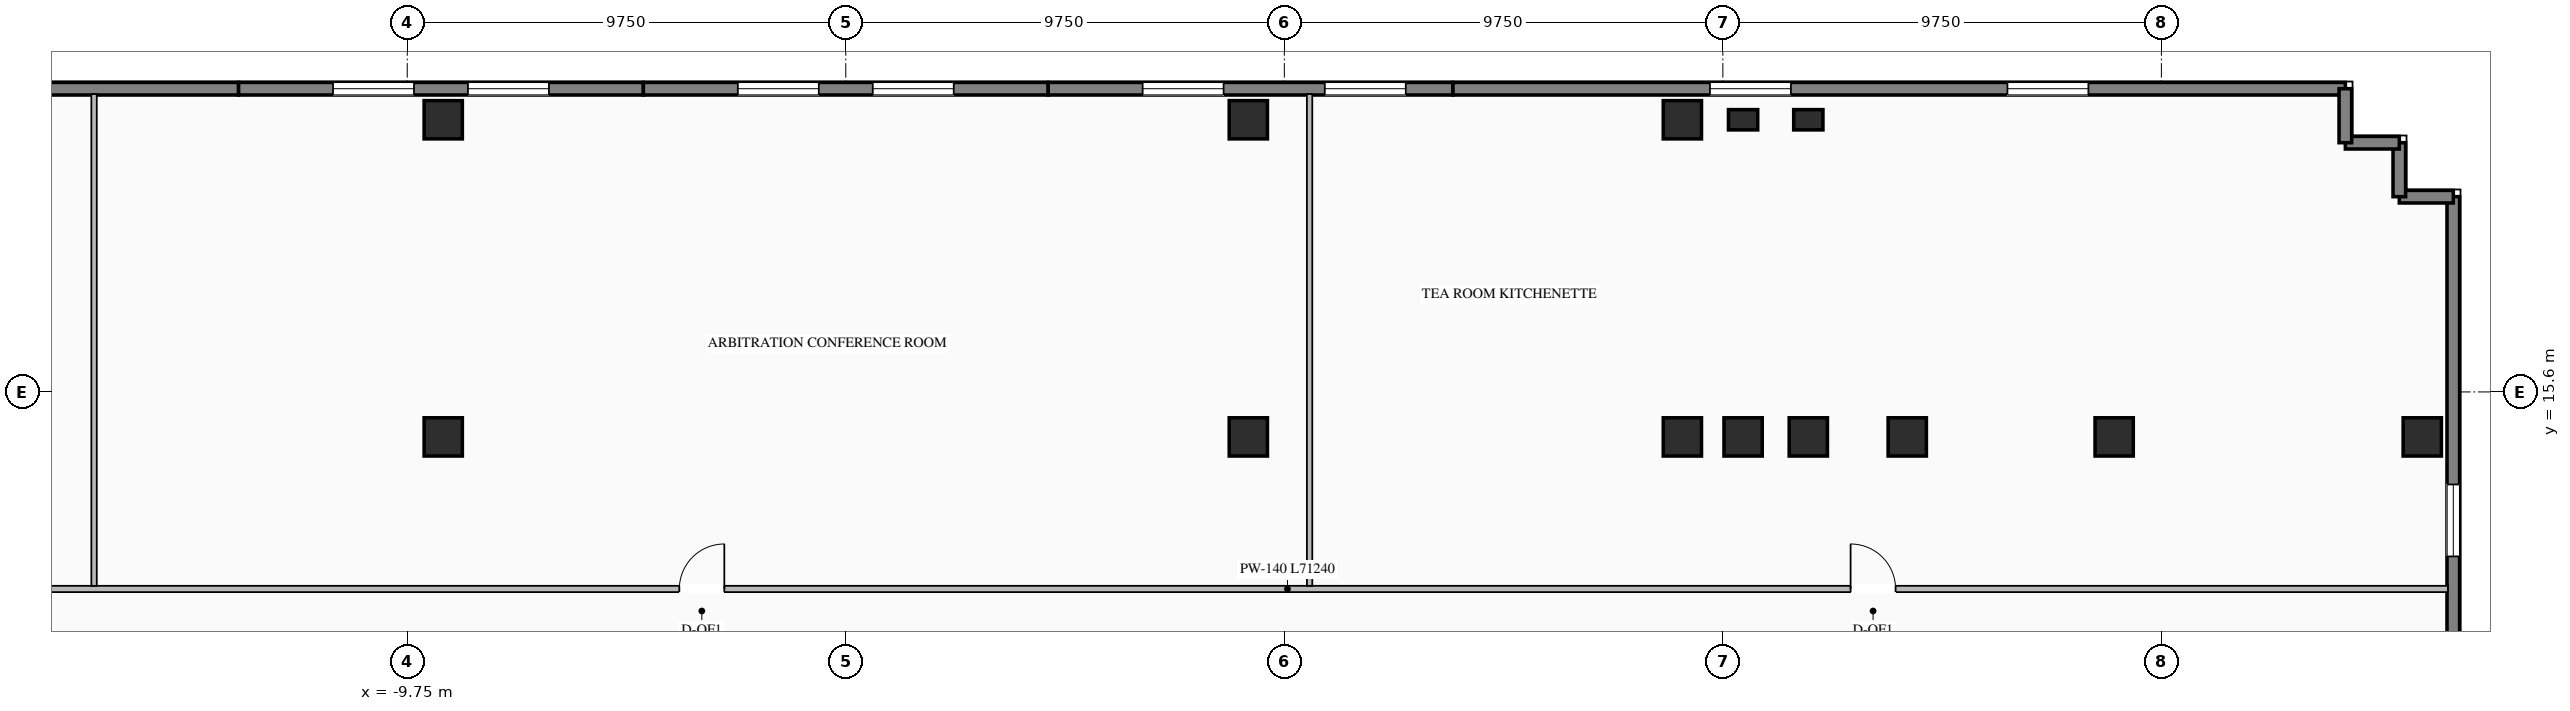
"""IFC4 building model, lengths in metres.
Left out: names, types, materials, properties, quantities, classifications, styles, units other than length and angle.
Written with IfcOpenShell. Run it as: python <this file> out.ifc"""

import sys

from ifc_helpers import new_model, si_unit, direction, frame, frame_2d, origin, origin_2d, place, context, subcontext, project, spatial, rectangle, i_section, extrude, element, fill, save


model = new_model("IFC4")
c1 = context("Model", 3, precision=1e-05, world=origin(), true_north=direction((0.0, 1.0)))
c2 = subcontext(c1, "Body", "Model", "MODEL_VIEW")
j1 = project(units=[si_unit("LENGTHUNIT", "METRE"), si_unit("PLANEANGLEUNIT", "RADIAN")], contexts=[c1])
p1 = place(None, origin())
s1 = spatial("IfcSite", under=j1, at=p1, CompositionType="ELEMENT")
p2 = place(p1, origin())
s2 = spatial("IfcBuilding", under=s1, at=p2, CompositionType="ELEMENT")
p3 = place(p2, frame((0.0, 0.0, 31.2)))
s3 = spatial("IfcBuildingStorey", under=s2, at=p3, CompositionType="ELEMENT", Elevation=31.2)
for number, where, z_axis, x_axis in (
    (1, (-8.95, 14.6, 0.0), (0.0, 0.0, 1.0), (1.0, 0.0, 0.0)),
    (2, (8.95, 14.6, 0.0), (0.0, 0.0, 1.0), (1.0, 0.0, 0.0)),
    (3, (18.6, 14.6, 0.0), (0.0, 0.0, 1.0), (1.0, 0.0, 0.0)),
    (4, (19.95, 14.6, 0.0), (0.0, 0.0, 1.0), (1.0, 0.0, 0.0)),
    (5, (21.4, 14.6, 0.0), (0.0, 0.0, 1.0), (1.0, 0.0, 0.0)),
    (6, (23.6, 14.6, 0.0), (0.0, 0.0, 1.0), (1.0, 0.0, 0.0)),
    (7, (28.2, 14.6, 0.0), (0.0, 0.0, 1.0), (1.0, 0.0, 0.0)),
    (8, (-8.95, 21.65, 0.0), (0.0, 0.0, 1.0), (1.0, 0.0, 0.0)),
    (9, (8.95, 21.65, 0.0), (0.0, 0.0, 1.0), (1.0, 0.0, 0.0)),
    (10, (18.6, 21.65, 0.0), (0.0, 0.0, 1.0), (1.0, 0.0, 0.0)),
    (11, (35.05, 14.6, 0.0), (0.0, 0.0, 1.0), (1.0, 0.0, 0.0)),
):
    element("IfcColumn", number, at=place(p3, frame(where, z_axis=z_axis, x_axis=x_axis)), inside=s3, PredefinedType="COLUMN", context=c2, shape_type="SweptSolid", body=[
        extrude(i_section(OverallWidth=0.85, OverallDepth=0.85, WebThickness=0.032, FlangeThickness=0.048, at=origin_2d()), origin(), (0.0, 0.0, 1.0), 3.45),
    ])
for number, where, z_axis, x_axis in (
    (12, (19.95, 21.65, 0.0), (0.0, 0.0, 1.0), (1.0, 0.0, 0.0)),
    (13, (21.4, 21.65, 0.0), (0.0, 0.0, 1.0), (1.0, 0.0, 0.0)),
):
    element("IfcColumn", number, at=place(p3, frame(where, z_axis=z_axis, x_axis=x_axis)), inside=s3, PredefinedType="PILASTER", context=c2, shape_type="SweptSolid", body=[
        extrude(rectangle(XDim=0.65, YDim=0.45, at=origin_2d()), origin(), (0.0, 0.0, 1.0), 3.45),
    ])
p4 = place(p3, frame((-33.34, 22.34, 0.0), z_axis=(0.0, 0.0, 1.0), x_axis=(1.0, 0.0, 0.0)))
e14 = element("IfcWall", 14, at=p4, inside=s3, PredefinedType="STANDARD", context=c2, shape_type="SweptSolid", body=[
    extrude(rectangle(XDim=19.84, YDim=0.28, at=frame_2d((9.92, 0.0))), origin(), (0.0, 0.0, 1.0), 3.25),
])
p5 = place(p4, frame((5.713, 0.0, 0.76)))
e15 = element("IfcOpeningElement", 15, at=p5, cuts=e14, PredefinedType="OPENING", context=c2, shape_type="SweptSolid", body=[
    extrude(rectangle(XDim=1.8, YDim=1.95, at=frame_2d((0.9, 0.975))), frame((0.0, 0.15, 0.0), z_axis=(0.0, -1.0, 0.0), x_axis=(1.0, 0.0, 0.0)), (0.0, 0.0, 1.0), 0.3),
])
p6 = place(p4, frame((12.327, 0.0, 0.76)))
e16 = element("IfcOpeningElement", 16, at=p6, cuts=e14, PredefinedType="OPENING", context=c2, shape_type="SweptSolid", body=[
    extrude(rectangle(XDim=1.8, YDim=1.95, at=frame_2d((0.9, 0.975))), frame((0.0, 0.15, 0.0), z_axis=(0.0, -1.0, 0.0), x_axis=(1.0, 0.0, 0.0)), (0.0, 0.0, 1.0), 0.3),
])
p7 = place(p3, frame((-13.5, 22.34, 0.0), z_axis=(0.0, 0.0, 1.0), x_axis=(1.0, 0.0, 0.0)))
e17 = element("IfcWall", 17, at=p7, inside=s3, PredefinedType="STANDARD", context=c2, shape_type="SweptSolid", body=[
    extrude(rectangle(XDim=9.0, YDim=0.28, at=frame_2d((4.5, 0.0))), origin(), (0.0, 0.0, 1.0), 3.25),
])
p8 = place(p7, frame((2.1, 0.0, 0.76)))
e18 = element("IfcOpeningElement", 18, at=p8, cuts=e17, PredefinedType="OPENING", context=c2, shape_type="SweptSolid", body=[
    extrude(rectangle(XDim=1.8, YDim=1.95, at=frame_2d((0.9, 0.975))), frame((0.0, 0.15, 0.0), z_axis=(0.0, -1.0, 0.0), x_axis=(1.0, 0.0, 0.0)), (0.0, 0.0, 1.0), 0.3),
])
p9 = place(p7, frame((5.1, 0.0, 0.76)))
e19 = element("IfcOpeningElement", 19, at=p9, cuts=e17, PredefinedType="OPENING", context=c2, shape_type="SweptSolid", body=[
    extrude(rectangle(XDim=1.8, YDim=1.95, at=frame_2d((0.9, 0.975))), frame((0.0, 0.15, 0.0), z_axis=(0.0, -1.0, 0.0), x_axis=(1.0, 0.0, 0.0)), (0.0, 0.0, 1.0), 0.3),
])
p10 = place(p3, frame((-4.5, 22.34, 0.0), z_axis=(0.0, 0.0, 1.0), x_axis=(1.0, 0.0, 0.0)))
e20 = element("IfcWall", 20, at=p10, inside=s3, PredefinedType="STANDARD", context=c2, shape_type="SweptSolid", body=[
    extrude(rectangle(XDim=9.0, YDim=0.28, at=frame_2d((4.5, 0.0))), origin(), (0.0, 0.0, 1.0), 3.25),
])
p11 = place(p10, frame((2.1, 0.0, 0.76)))
e21 = element("IfcOpeningElement", 21, at=p11, cuts=e20, PredefinedType="OPENING", context=c2, shape_type="SweptSolid", body=[
    extrude(rectangle(XDim=1.8, YDim=1.95, at=frame_2d((0.9, 0.975))), frame((0.0, 0.15, 0.0), z_axis=(0.0, -1.0, 0.0), x_axis=(1.0, 0.0, 0.0)), (0.0, 0.0, 1.0), 0.3),
])
p12 = place(p10, frame((5.1, 0.0, 0.76)))
e22 = element("IfcOpeningElement", 22, at=p12, cuts=e20, PredefinedType="OPENING", context=c2, shape_type="SweptSolid", body=[
    extrude(rectangle(XDim=1.8, YDim=1.95, at=frame_2d((0.9, 0.975))), frame((0.0, 0.15, 0.0), z_axis=(0.0, -1.0, 0.0), x_axis=(1.0, 0.0, 0.0)), (0.0, 0.0, 1.0), 0.3),
])
p13 = place(p3, frame((4.5, 22.34, 0.0), z_axis=(0.0, 0.0, 1.0), x_axis=(1.0, 0.0, 0.0)))
e23 = element("IfcWall", 23, at=p13, inside=s3, PredefinedType="STANDARD", context=c2, shape_type="SweptSolid", body=[
    extrude(rectangle(XDim=9.0, YDim=0.28, at=frame_2d((4.5, 0.0))), origin(), (0.0, 0.0, 1.0), 3.25),
])
p14 = place(p13, frame((2.1, 0.0, 0.76)))
e24 = element("IfcOpeningElement", 24, at=p14, cuts=e23, PredefinedType="OPENING", context=c2, shape_type="SweptSolid", body=[
    extrude(rectangle(XDim=1.8, YDim=1.95, at=frame_2d((0.9, 0.975))), frame((0.0, 0.15, 0.0), z_axis=(0.0, -1.0, 0.0), x_axis=(1.0, 0.0, 0.0)), (0.0, 0.0, 1.0), 0.3),
])
p15 = place(p13, frame((6.15, 0.0, 0.76)))
e25 = element("IfcOpeningElement", 25, at=p15, cuts=e23, PredefinedType="OPENING", context=c2, shape_type="SweptSolid", body=[
    extrude(rectangle(XDim=1.8, YDim=1.95, at=frame_2d((0.9, 0.975))), frame((0.0, 0.15, 0.0), z_axis=(0.0, -1.0, 0.0), x_axis=(1.0, 0.0, 0.0)), (0.0, 0.0, 1.0), 0.3),
])
p16 = place(p3, frame((13.5, 22.34, 0.0), z_axis=(0.0, 0.0, 1.0), x_axis=(1.0, 0.0, 0.0)))
e26 = element("IfcWall", 26, at=p16, inside=s3, PredefinedType="STANDARD", context=c2, shape_type="SweptSolid", body=[
    extrude(rectangle(XDim=19.84, YDim=0.28, at=frame_2d((9.92, 0.0))), origin(), (0.0, 0.0, 1.0), 3.25),
])
p17 = place(p16, frame((5.713, 0.0, 0.76)))
e27 = element("IfcOpeningElement", 27, at=p17, cuts=e26, PredefinedType="OPENING", context=c2, shape_type="SweptSolid", body=[
    extrude(rectangle(XDim=1.8, YDim=1.95, at=frame_2d((0.9, 0.975))), frame((0.0, 0.15, 0.0), z_axis=(0.0, -1.0, 0.0), x_axis=(1.0, 0.0, 0.0)), (0.0, 0.0, 1.0), 0.3),
])
p18 = place(p16, frame((12.327, 0.0, 0.76)))
e28 = element("IfcOpeningElement", 28, at=p18, cuts=e26, PredefinedType="OPENING", context=c2, shape_type="SweptSolid", body=[
    extrude(rectangle(XDim=1.8, YDim=1.95, at=frame_2d((0.9, 0.975))), frame((0.0, 0.15, 0.0), z_axis=(0.0, -1.0, 0.0), x_axis=(1.0, 0.0, 0.0)), (0.0, 0.0, 1.0), 0.3),
])
p19 = place(p3, frame((35.74, 19.94, 0.0), z_axis=(0.0, 0.0, 1.0), x_axis=(0.0, -1.0, 0.0)))
e29 = element("IfcWall", 29, at=p19, inside=s3, PredefinedType="STANDARD", context=c2, shape_type="SweptSolid", body=[
    extrude(rectangle(XDim=19.94, YDim=0.28, at=frame_2d((9.97, 0.0))), origin(), (0.0, 0.0, 1.0), 3.25),
])
p20 = place(p19, frame((6.397, 0.0, 0.76)))
e30 = element("IfcOpeningElement", 30, at=p20, cuts=e29, PredefinedType="OPENING", context=c2, shape_type="SweptSolid", body=[
    extrude(rectangle(XDim=1.6, YDim=1.95, at=frame_2d((0.8, 0.975))), frame((0.0, 0.15, 0.0), z_axis=(0.0, -1.0, 0.0), x_axis=(1.0, 0.0, 0.0)), (0.0, 0.0, 1.0), 0.3),
])
p21 = place(p19, frame((12.493, 0.0, 0.76)))
e31 = element("IfcOpeningElement", 31, at=p21, cuts=e29, PredefinedType="OPENING", context=c2, shape_type="SweptSolid", body=[
    extrude(rectangle(XDim=1.6, YDim=1.95, at=frame_2d((0.8, 0.975))), frame((0.0, 0.15, 0.0), z_axis=(0.0, -1.0, 0.0), x_axis=(1.0, 0.0, 0.0)), (0.0, 0.0, 1.0), 0.3),
])
for number, where, z_axis, x_axis in (
    (32, (35.74, 19.94, 0.0), (0.0, 0.0, 1.0), (-1.0, 0.0, 0.0)),
    (33, (34.54, 19.94, 0.0), (0.0, 0.0, 1.0), (0.0, 1.0, 0.0)),
    (34, (34.54, 21.14, 0.0), (0.0, 0.0, 1.0), (-1.0, 0.0, 0.0)),
):
    element("IfcWall", number, at=place(p3, frame(where, z_axis=z_axis, x_axis=x_axis)), inside=s3, PredefinedType="STANDARD", context=c2, shape_type="SweptSolid", body=[
        extrude(rectangle(XDim=1.2, YDim=0.28, at=frame_2d((0.6, 0.0))), origin(), (0.0, 0.0, 1.0), 3.25),
    ])
p22 = place(p3, frame((33.34, 21.14, 0.0), z_axis=(0.0, 0.0, 1.0), x_axis=(0.0, 1.0, 0.0)))
e35 = element("IfcWall", 35, at=p22, inside=s3, PredefinedType="STANDARD", context=c2, shape_type="SweptSolid", body=[
    extrude(rectangle(XDim=1.2, YDim=0.28, at=frame_2d((0.6, 0.0))), origin(), (0.0, 0.0, 1.0), 3.25),
])
p23 = place(p3, frame((-35.62, 11.22, 0.0), z_axis=(0.0, 0.0, 1.0), x_axis=(1.0, 0.0, 0.0)))
e36 = element("IfcWall", 36, at=p23, inside=s3, PredefinedType="STANDARD", context=c2, shape_type="SweptSolid", body=[
    extrude(rectangle(XDim=71.24, YDim=0.14, at=frame_2d((35.62, 0.0))), origin(), (0.0, 0.0, 1.0), 3.25),
])
p24 = place(p23, frame((9.08, 0.0, 0.0)))
e37 = element("IfcOpeningElement", 37, at=p24, cuts=e36, PredefinedType="OPENING", context=c2, shape_type="SweptSolid", body=[
    extrude(rectangle(XDim=1.0, YDim=2.08, at=frame_2d((0.5, 1.04))), frame((0.0, 0.08, 0.0), z_axis=(0.0, -1.0, 0.0), x_axis=(1.0, 0.0, 0.0)), (0.0, 0.0, 1.0), 0.16),
])
p25 = place(p23, frame((31.919, 0.0, 0.0)))
e38 = element("IfcOpeningElement", 38, at=p25, cuts=e36, PredefinedType="OPENING", context=c2, shape_type="SweptSolid", body=[
    extrude(rectangle(XDim=1.0, YDim=2.08, at=frame_2d((0.5, 1.04))), frame((0.0, 0.08, 0.0), z_axis=(0.0, -1.0, 0.0), x_axis=(1.0, 0.0, 0.0)), (0.0, 0.0, 1.0), 0.16),
])
p26 = place(p23, frame((57.96, 0.0, 0.0)))
e39 = element("IfcOpeningElement", 39, at=p26, cuts=e36, PredefinedType="OPENING", context=c2, shape_type="SweptSolid", body=[
    extrude(rectangle(XDim=1.0, YDim=2.08, at=frame_2d((0.5, 1.04))), frame((0.0, 0.08, 0.0), z_axis=(0.0, -1.0, 0.0), x_axis=(1.0, 0.0, 0.0)), (0.0, 0.0, 1.0), 0.16),
])
for number, where, z_axis, x_axis in (
    (40, (-16.713, 11.29, 0.0), (0.0, 0.0, 1.0), (0.0, 1.0, 0.0)),
    (41, (10.312, 11.29, 0.0), (0.0, 0.0, 1.0), (0.0, 1.0, 0.0)),
):
    element("IfcWall", number, at=place(p3, frame(where, z_axis=z_axis, x_axis=x_axis)), inside=s3, PredefinedType="STANDARD", context=c2, shape_type="SweptSolid", body=[
        extrude(rectangle(XDim=10.93, YDim=0.12, at=frame_2d((5.465, 0.0))), origin(), (0.0, 0.0, 1.0), 3.25),
    ])
p27 = place(p8, origin())
e42 = element("IfcWindow", 42, at=p27, inside=s3, PartitioningType="SINGLE_PANEL", PredefinedType="WINDOW", context=c2, shape_type="SweptSolid", body=[
    extrude(rectangle(XDim=1.8, YDim=1.95, at=frame_2d((0.9, 0.975))), frame((0.0, 0.03, 0.0), z_axis=(0.0, -1.0, 0.0), x_axis=(1.0, 0.0, 0.0)), (0.0, 0.0, 1.0), 0.06),
])
fill(e18, e42)
p28 = place(p9, origin())
e43 = element("IfcWindow", 43, at=p28, inside=s3, PartitioningType="SINGLE_PANEL", PredefinedType="WINDOW", context=c2, shape_type="SweptSolid", body=[
    extrude(rectangle(XDim=1.8, YDim=1.95, at=frame_2d((0.9, 0.975))), frame((0.0, 0.03, 0.0), z_axis=(0.0, -1.0, 0.0), x_axis=(1.0, 0.0, 0.0)), (0.0, 0.0, 1.0), 0.06),
])
fill(e19, e43)
p29 = place(p11, origin())
e44 = element("IfcWindow", 44, at=p29, inside=s3, PartitioningType="SINGLE_PANEL", PredefinedType="WINDOW", context=c2, shape_type="SweptSolid", body=[
    extrude(rectangle(XDim=1.8, YDim=1.95, at=frame_2d((0.9, 0.975))), frame((0.0, 0.03, 0.0), z_axis=(0.0, -1.0, 0.0), x_axis=(1.0, 0.0, 0.0)), (0.0, 0.0, 1.0), 0.06),
])
fill(e21, e44)
p30 = place(p12, origin())
e45 = element("IfcWindow", 45, at=p30, inside=s3, PartitioningType="SINGLE_PANEL", PredefinedType="WINDOW", context=c2, shape_type="SweptSolid", body=[
    extrude(rectangle(XDim=1.8, YDim=1.95, at=frame_2d((0.9, 0.975))), frame((0.0, 0.03, 0.0), z_axis=(0.0, -1.0, 0.0), x_axis=(1.0, 0.0, 0.0)), (0.0, 0.0, 1.0), 0.06),
])
fill(e22, e45)
p31 = place(p14, origin())
e46 = element("IfcWindow", 46, at=p31, inside=s3, PartitioningType="SINGLE_PANEL", PredefinedType="WINDOW", context=c2, shape_type="SweptSolid", body=[
    extrude(rectangle(XDim=1.8, YDim=1.95, at=frame_2d((0.9, 0.975))), frame((0.0, 0.03, 0.0), z_axis=(0.0, -1.0, 0.0), x_axis=(1.0, 0.0, 0.0)), (0.0, 0.0, 1.0), 0.06),
])
fill(e24, e46)
p32 = place(p15, origin())
e47 = element("IfcWindow", 47, at=p32, inside=s3, PartitioningType="SINGLE_PANEL", PredefinedType="WINDOW", context=c2, shape_type="SweptSolid", body=[
    extrude(rectangle(XDim=1.8, YDim=1.95, at=frame_2d((0.9, 0.975))), frame((0.0, 0.03, 0.0), z_axis=(0.0, -1.0, 0.0), x_axis=(1.0, 0.0, 0.0)), (0.0, 0.0, 1.0), 0.06),
])
fill(e25, e47)
p33 = place(p17, origin())
e48 = element("IfcWindow", 48, at=p33, inside=s3, PartitioningType="SINGLE_PANEL", PredefinedType="WINDOW", context=c2, shape_type="SweptSolid", body=[
    extrude(rectangle(XDim=1.8, YDim=1.95, at=frame_2d((0.9, 0.975))), frame((0.0, 0.03, 0.0), z_axis=(0.0, -1.0, 0.0), x_axis=(1.0, 0.0, 0.0)), (0.0, 0.0, 1.0), 0.06),
])
fill(e27, e48)
p34 = place(p18, origin())
e49 = element("IfcWindow", 49, at=p34, inside=s3, PartitioningType="SINGLE_PANEL", PredefinedType="WINDOW", context=c2, shape_type="SweptSolid", body=[
    extrude(rectangle(XDim=1.8, YDim=1.95, at=frame_2d((0.9, 0.975))), frame((0.0, 0.03, 0.0), z_axis=(0.0, -1.0, 0.0), x_axis=(1.0, 0.0, 0.0)), (0.0, 0.0, 1.0), 0.06),
])
fill(e28, e49)
p35 = place(p20, origin())
e50 = element("IfcWindow", 50, at=p35, inside=s3, PartitioningType="SINGLE_PANEL", PredefinedType="WINDOW", context=c2, shape_type="SweptSolid", body=[
    extrude(rectangle(XDim=1.6, YDim=1.95, at=frame_2d((0.8, 0.975))), frame((0.0, 0.03, 0.0), z_axis=(0.0, -1.0, 0.0), x_axis=(1.0, 0.0, 0.0)), (0.0, 0.0, 1.0), 0.06),
])
fill(e30, e50)
p36 = place(p25, origin())
e51 = element("IfcDoor", 51, at=p36, inside=s3, OperationType="SINGLE_SWING_RIGHT", PredefinedType="DOOR", context=c2, shape_type="SweptSolid", body=[
    extrude(rectangle(XDim=1.0, YDim=2.08, at=frame_2d((0.5, 1.04))), frame((0.0, 0.025, 0.0), z_axis=(0.0, -1.0, 0.0), x_axis=(1.0, 0.0, 0.0)), (0.0, 0.0, 1.0), 0.05),
])
fill(e38, e51)
p37 = place(p26, origin())
e52 = element("IfcDoor", 52, at=p37, inside=s3, OperationType="SINGLE_SWING_LEFT", PredefinedType="DOOR", context=c2, shape_type="SweptSolid", body=[
    extrude(rectangle(XDim=1.0, YDim=2.08, at=frame_2d((0.5, 1.04))), frame((0.0, 0.025, 0.0), z_axis=(0.0, -1.0, 0.0), x_axis=(1.0, 0.0, 0.0)), (0.0, 0.0, 1.0), 0.05),
])
fill(e39, e52)
save(model, sys.argv[1])
